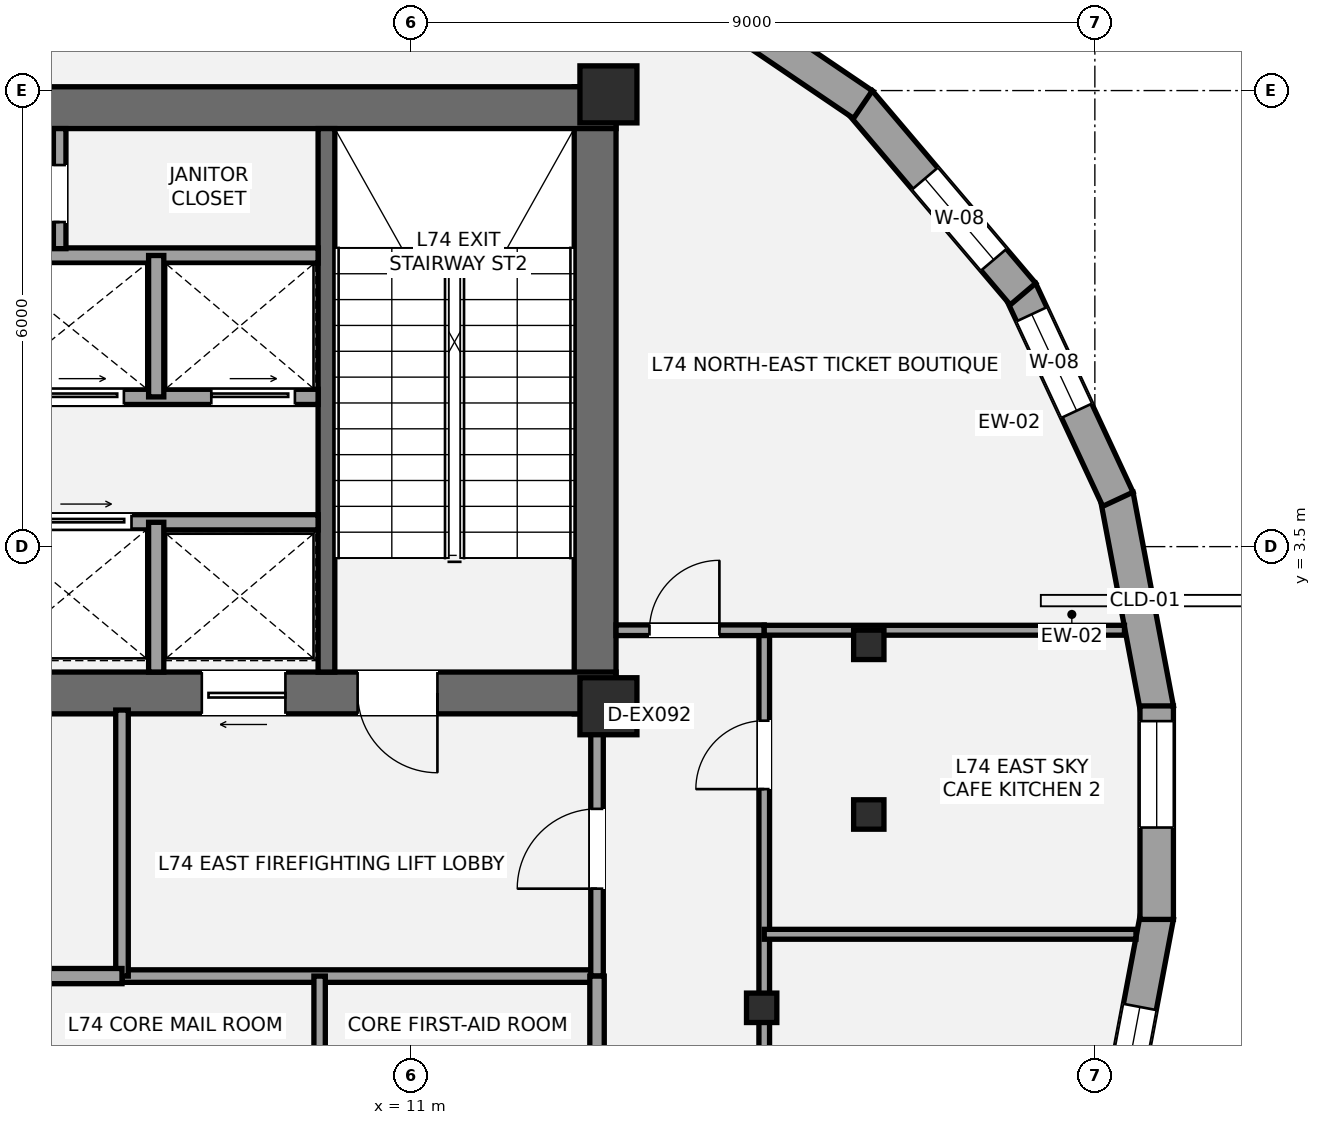
"""IFC4 building model, lengths in metres.
Left out: names, types, materials, properties, quantities, classifications, styles, units other than length and angle.
Written with IfcOpenShell. Run it as: python <this file> out.ifc"""

import sys

from ifc_helpers import new_model, si_unit, direction, frame, frame_2d, origin, origin_2d, place, context, subcontext, project, spatial, rectangle, i_section, extrude, element, fill, save


model = new_model("IFC4")
c1 = context("Model", 3, precision=1e-05, world=origin(), true_north=direction((0.0, 1.0)))
c2 = subcontext(c1, "Body", "Model", "MODEL_VIEW")
j1 = project(units=[si_unit("LENGTHUNIT", "METRE"), si_unit("PLANEANGLEUNIT", "RADIAN")], contexts=[c1])
p1 = place(None, origin())
s1 = spatial("IfcSite", under=j1, at=p1, CompositionType="ELEMENT")
p2 = place(p1, origin())
s2 = spatial("IfcBuilding", under=s1, at=p2, CompositionType="ELEMENT")
p3 = place(p2, frame((0.0, 0.0, 260.4)))
s3 = spatial("IfcBuildingStorey", under=s2, at=p3, CompositionType="ELEMENT", Elevation=260.4)
p4 = place(p3, frame((13.425, 1.3, 0.0), z_axis=(0.0, 0.0, 1.0), x_axis=(0.0, 1.0, 0.0)))
e1 = element("IfcWall", 1, at=p4, inside=s3, PredefinedType="SHEAR", context=c2, shape_type="SweptSolid", body=[
    extrude(rectangle(XDim=8.25, YDim=0.55, at=frame_2d((4.125, 0.0))), origin(), (0.0, 0.0, 1.0), 4.4),
])
p5 = place(p3, frame((4.525, 9.275, 0.0), z_axis=(0.0, 0.0, 1.0), x_axis=(1.0, 0.0, 0.0)))
e2 = element("IfcWall", 2, at=p5, inside=s3, PredefinedType="SHEAR", context=c2, shape_type="SweptSolid", body=[
    extrude(rectangle(XDim=9.175, YDim=0.55, at=frame_2d((4.587, 0.0))), origin(), (0.0, 0.0, 1.0), 4.4),
])
p6 = place(p3, frame((13.7, 1.575, 0.0), z_axis=(0.0, 0.0, 1.0), x_axis=(-1.0, 0.0, 0.0)))
e3 = element("IfcWall", 3, at=p6, inside=s3, PredefinedType="SHEAR", context=c2, shape_type="SweptSolid", body=[
    extrude(rectangle(XDim=8.775, YDim=0.55, at=frame_2d((4.387, 0.0))), origin(), (0.0, 0.0, 1.0), 4.4),
])
p7 = place(p6, frame((2.35, 0.0, 0.0)))
e4 = element("IfcOpeningElement", 4, at=p7, cuts=e3, PredefinedType="OPENING", context=c2, shape_type="SweptSolid", body=[
    extrude(rectangle(XDim=1.05, YDim=2.15, at=frame_2d((0.525, 1.075))), frame((0.0, 0.285, 0.0), z_axis=(0.0, -1.0, 0.0), x_axis=(1.0, 0.0, 0.0)), (0.0, 0.0, 1.0), 0.57),
])
p8 = place(p6, frame((4.35, 0.0, 0.0)))
e5 = element("IfcOpeningElement", 5, at=p8, cuts=e3, PredefinedType="OPENING", context=c2, shape_type="SweptSolid", body=[
    extrude(rectangle(XDim=1.1, YDim=2.2, at=frame_2d((0.55, 1.1))), frame((0.0, 0.285, 0.0), z_axis=(0.0, -1.0, 0.0), x_axis=(1.0, 0.0, 0.0)), (0.0, 0.0, 1.0), 0.57),
])
p9 = place(p3, frame((9.89, 1.85, 0.0), z_axis=(0.0, 0.0, 1.0), x_axis=(0.0, 1.0, 0.0)))
e6 = element("IfcWall", 6, at=p9, inside=s3, PredefinedType="SHEAR", context=c2, shape_type="SweptSolid", body=[
    extrude(rectangle(XDim=7.15, YDim=0.22, at=frame_2d((3.575, 0.0))), origin(), (0.0, 0.0, 1.0), 4.4),
])
for number, where, z_axis, x_axis in (
    (7, (13.6, 1.4, 0.0), (0.0, 0.0, 1.0), (1.0, 0.0, 0.0)),
    (8, (13.6, 9.45, 0.0), (0.0, 0.0, 1.0), (1.0, 0.0, 0.0)),
):
    element("IfcColumn", number, at=place(p3, frame(where, z_axis=z_axis, x_axis=x_axis)), inside=s3, PredefinedType="PILASTER", context=c2, shape_type="SweptSolid", body=[
        extrude(rectangle(XDim=0.75, YDim=0.75, at=origin_2d()), origin(), (0.0, 0.0, 1.0), 4.4),
    ])
for number, where, z_axis, x_axis in (
    (9, (17.026, 2.208, 0.0), (0.0, 0.0, 1.0), (1.0, 0.0, 0.0)),
    (10, (15.616, -2.567, 0.0), (0.0, 0.0, 1.0), (1.0, 0.0, 0.0)),
    (11, (17.026, -0.024, 0.0), (0.0, 0.0, 1.0), (1.0, 0.0, 0.0)),
):
    element("IfcColumn", number, at=place(p3, frame(where, z_axis=z_axis, x_axis=x_axis)), inside=s3, PredefinedType="COLUMN", context=c2, shape_type="SweptSolid", body=[
        extrude(i_section(OverallWidth=0.399, OverallDepth=0.387, WebThickness=0.021, FlangeThickness=0.033, at=origin_2d()), origin(), (0.0, 0.0, 1.0), 4.4),
    ])
p10 = place(p3, frame((20.286, 4.176, 0.0), z_axis=(0.0, 0.0, 1.0), x_axis=(0.185555519657, -0.982633781795, 0.0)))
e12 = element("IfcWall", 12, at=p10, inside=s3, PredefinedType="STANDARD", context=c2, shape_type="SweptSolid", body=[
    extrude(rectangle(XDim=2.862, YDim=0.44, at=frame_2d((1.431, 0.0))), origin(), (0.0, 0.0, 1.0), 3.546),
])
p11 = place(p3, frame((19.022, 6.872, 0.0), z_axis=(0.0, 0.0, 1.0), x_axis=(0.422378607623, -0.906419501016, 0.0)))
e13 = element("IfcWall", 13, at=p11, inside=s3, PredefinedType="STANDARD", context=c2, shape_type="SweptSolid", body=[
    extrude(rectangle(XDim=3.033, YDim=0.44, at=frame_2d((1.517, 0.0))), origin(), (0.0, 0.0, 1.0), 3.546),
])
p12 = place(p11, frame((0.348, 0.0, 0.58)))
e14 = element("IfcOpeningElement", 14, at=p12, cuts=e13, PredefinedType="OPENING", context=c2, shape_type="SweptSolid", body=[
    extrude(rectangle(XDim=1.4, YDim=1.55, at=frame_2d((0.7, 0.775))), frame((0.0, 0.23, 0.0), z_axis=(0.0, -1.0, 0.0), x_axis=(1.0, 0.0, 0.0)), (0.0, 0.0, 1.0), 0.46),
])
p13 = place(p3, frame((16.904, 9.356, 0.0), z_axis=(0.0, 0.0, 1.0), x_axis=(0.647061604266, -0.762437722233, 0.0)))
e15 = element("IfcWall", 15, at=p13, inside=s3, PredefinedType="STANDARD", context=c2, shape_type="SweptSolid", body=[
    extrude(rectangle(XDim=3.322, YDim=0.44, at=frame_2d((1.661, 0.0))), origin(), (0.0, 0.0, 1.0), 3.546),
])
p14 = place(p13, frame((1.329, 0.0, 0.58)))
e16 = element("IfcOpeningElement", 16, at=p14, cuts=e15, PredefinedType="OPENING", context=c2, shape_type="SweptSolid", body=[
    extrude(rectangle(XDim=1.4, YDim=1.55, at=frame_2d((0.7, 0.775))), frame((0.0, 0.23, 0.0), z_axis=(0.0, -1.0, 0.0), x_axis=(1.0, 0.0, 0.0)), (0.0, 0.0, 1.0), 0.46),
])
p15 = place(p3, frame((13.887, 11.391, 0.0), z_axis=(0.0, 0.0, 1.0), x_axis=(0.827739678134, -0.561112310721, 0.0)))
e17 = element("IfcWall", 17, at=p15, inside=s3, PredefinedType="STANDARD", context=c2, shape_type="SweptSolid", body=[
    extrude(rectangle(XDim=3.698, YDim=0.44, at=frame_2d((1.849, 0.0))), origin(), (0.0, 0.0, 1.0), 3.55),
])
p16 = place(p15, frame((0.3, 0.0, 0.58)))
e18 = element("IfcOpeningElement", 18, at=p16, cuts=e17, PredefinedType="OPENING", context=c2, shape_type="SweptSolid", body=[
    extrude(rectangle(XDim=0.9, YDim=1.35, at=frame_2d((0.45, 0.675))), frame((0.0, 0.23, 0.0), z_axis=(0.0, -1.0, 0.0), x_axis=(1.0, 0.0, 0.0)), (0.0, 0.0, 1.0), 0.46),
])
p17 = place(p3, frame((20.817, -1.364, 0.0), z_axis=(0.0, 0.0, 1.0), x_axis=(-0.185555519657, -0.982633781795, 0.0)))
e19 = element("IfcWall", 19, at=p17, inside=s3, PredefinedType="STANDARD", context=c2, shape_type="SweptSolid", body=[
    extrude(rectangle(XDim=2.862, YDim=0.44, at=frame_2d((1.431, 0.0))), origin(), (0.0, 0.0, 1.0), 3.546),
])
p18 = place(p17, frame((1.213, 0.0, 0.6)))
e20 = element("IfcOpeningElement", 20, at=p18, cuts=e19, PredefinedType="OPENING", context=c2, shape_type="SweptSolid", body=[
    extrude(rectangle(XDim=1.4, YDim=1.55, at=frame_2d((0.7, 0.775))), frame((0.0, 0.23, 0.0), z_axis=(0.0, -1.0, 0.0), x_axis=(1.0, 0.0, 0.0)), (0.0, 0.0, 1.0), 0.46),
])
p19 = place(p3, frame((20.814, 1.404, 0.0), z_axis=(0.0, 0.0, 1.0), x_axis=(0.0, -1.0, 0.0)))
e21 = element("IfcWall", 21, at=p19, inside=s3, PredefinedType="STANDARD", context=c2, shape_type="SweptSolid", body=[
    extrude(rectangle(XDim=2.809, YDim=0.44, at=frame_2d((1.404, 0.0))), origin(), (0.0, 0.0, 1.0), 3.546),
])
p20 = place(p19, frame((0.2, 0.0, 0.58)))
e22 = element("IfcOpeningElement", 22, at=p20, cuts=e21, PredefinedType="OPENING", context=c2, shape_type="SweptSolid", body=[
    extrude(rectangle(XDim=1.4, YDim=1.55, at=frame_2d((0.7, 0.775))), frame((0.0, 0.23, 0.0), z_axis=(0.0, -1.0, 0.0), x_axis=(1.0, 0.0, 0.0)), (0.0, 0.0, 1.0), 0.46),
])
p21 = place(p3, frame((7.2, -2.15, 0.0), z_axis=(0.0, 0.0, 1.0), x_axis=(1.0, 0.0, 0.0)))
e23 = element("IfcWall", 23, at=p21, inside=s3, PredefinedType="PARTITIONING", context=c2, shape_type="SweptSolid", body=[
    extrude(rectangle(XDim=6.25, YDim=0.165, at=frame_2d((3.125, 0.0))), origin(), (0.0, 0.0, 1.0), 2.37),
])
p22 = place(p3, frame((7.2, -2.15, 0.0), z_axis=(0.0, 0.0, 1.0), x_axis=(0.0, 1.0, 0.0)))
e24 = element("IfcWall", 24, at=p22, inside=s3, PredefinedType="PARTITIONING", context=c2, shape_type="SweptSolid", body=[
    extrude(rectangle(XDim=3.5, YDim=0.165, at=frame_2d((1.75, 0.0))), origin(), (0.0, 0.0, 1.0), 2.37),
])
p23 = place(p3, frame((13.45, -2.15, 0.0), z_axis=(0.0, 0.0, 1.0), x_axis=(0.0, 1.0, 0.0)))
e25 = element("IfcWall", 25, at=p23, inside=s3, PredefinedType="PARTITIONING", context=c2, shape_type="SweptSolid", body=[
    extrude(rectangle(XDim=3.5, YDim=0.165, at=frame_2d((1.75, 0.0))), origin(), (0.0, 0.0, 1.0), 2.37),
])
p24 = place(p23, frame((1.15, 0.0, 0.0)))
e26 = element("IfcOpeningElement", 26, at=p24, cuts=e25, PredefinedType="OPENING", context=c2, shape_type="SweptSolid", body=[
    extrude(rectangle(XDim=1.05, YDim=2.15, at=frame_2d((0.525, 1.075))), frame((0.0, 0.093, 0.0), z_axis=(0.0, -1.0, 0.0), x_axis=(1.0, 0.0, 0.0)), (0.0, 0.0, 1.0), 0.185),
])
p25 = place(p3, frame((4.95, -2.15, 0.0), z_axis=(0.0, 0.0, 1.0), x_axis=(1.0, 0.0, 0.0)))
e27 = element("IfcWall", 27, at=p25, inside=s3, PredefinedType="SOLIDWALL", context=c2, shape_type="SweptSolid", body=[
    extrude(rectangle(XDim=2.25, YDim=0.2, at=frame_2d((1.125, 0.0))), origin(), (0.0, 0.0, 1.0), 2.37),
])
p26 = place(p3, frame((5.475, 3.82, 0.0), z_axis=(0.0, 0.0, 1.0), x_axis=(1.0, 0.0, 0.0)))
e28 = element("IfcWall", 28, at=p26, inside=s3, PredefinedType="SOLIDWALL", context=c2, shape_type="SweptSolid", body=[
    extrude(rectangle(XDim=4.305, YDim=0.2, at=frame_2d((2.152, 0.0))), origin(), (0.0, 0.0, 1.0), 4.18),
])
p27 = place(p26, frame((0.65, 0.0, 0.0)))
e29 = element("IfcOpeningElement", 29, at=p27, cuts=e28, PredefinedType="OPENING", context=c2, shape_type="SweptSolid", body=[
    extrude(rectangle(XDim=1.2, YDim=2.2, at=frame_2d((0.6, 1.1))), frame((0.0, 0.11, 0.0), z_axis=(0.0, -1.0, 0.0), x_axis=(1.0, 0.0, 0.0)), (0.0, 0.0, 1.0), 0.22),
])
p28 = place(p3, frame((7.65, 1.85, 0.0), z_axis=(0.0, 0.0, 1.0), x_axis=(0.0, 1.0, 0.0)))
e30 = element("IfcWall", 30, at=p28, inside=s3, PredefinedType="SOLIDWALL", context=c2, shape_type="SweptSolid", body=[
    extrude(rectangle(XDim=1.97, YDim=0.2, at=frame_2d((0.985, 0.0))), origin(), (0.0, 0.0, 1.0), 4.18),
])
p29 = place(p3, frame((5.475, 5.47, 0.0), z_axis=(0.0, 0.0, 1.0), x_axis=(1.0, 0.0, 0.0)))
e31 = element("IfcWall", 31, at=p29, inside=s3, PredefinedType="SOLIDWALL", context=c2, shape_type="SweptSolid", body=[
    extrude(rectangle(XDim=4.305, YDim=0.2, at=frame_2d((2.152, 0.0))), origin(), (0.0, 0.0, 1.0), 4.18),
])
p30 = place(p29, frame((0.65, 0.0, 0.0)))
e32 = element("IfcOpeningElement", 32, at=p30, cuts=e31, PredefinedType="OPENING", context=c2, shape_type="SweptSolid", body=[
    extrude(rectangle(XDim=1.1, YDim=2.2, at=frame_2d((0.55, 1.1))), frame((0.0, 0.11, 0.0), z_axis=(0.0, -1.0, 0.0), x_axis=(1.0, 0.0, 0.0)), (0.0, 0.0, 1.0), 0.22),
])
p31 = place(p29, frame((2.9, 0.0, 0.0)))
e33 = element("IfcOpeningElement", 33, at=p31, cuts=e31, PredefinedType="OPENING", context=c2, shape_type="SweptSolid", body=[
    extrude(rectangle(XDim=1.1, YDim=2.2, at=frame_2d((0.55, 1.1))), frame((0.0, 0.11, 0.0), z_axis=(0.0, -1.0, 0.0), x_axis=(1.0, 0.0, 0.0)), (0.0, 0.0, 1.0), 0.22),
])
p32 = place(p3, frame((5.475, 7.33, 0.0), z_axis=(0.0, 0.0, 1.0), x_axis=(1.0, 0.0, 0.0)))
e34 = element("IfcWall", 34, at=p32, inside=s3, PredefinedType="SOLIDWALL", context=c2, shape_type="SweptSolid", body=[
    extrude(rectangle(XDim=4.305, YDim=0.2, at=frame_2d((2.152, 0.0))), origin(), (0.0, 0.0, 1.0), 4.18),
])
p33 = place(p3, frame((7.65, 5.47, 0.0), z_axis=(0.0, 0.0, 1.0), x_axis=(0.0, 1.0, 0.0)))
e35 = element("IfcWall", 35, at=p33, inside=s3, PredefinedType="SOLIDWALL", context=c2, shape_type="SweptSolid", body=[
    extrude(rectangle(XDim=1.86, YDim=0.2, at=frame_2d((0.93, 0.0))), origin(), (0.0, 0.0, 1.0), 4.18),
])
p34 = place(p3, frame((6.38, 7.42, 0.0), z_axis=(0.0, 0.0, 1.0), x_axis=(0.0, 1.0, 0.0)))
e36 = element("IfcWall", 36, at=p34, inside=s3, PredefinedType="PARTITIONING", context=c2, shape_type="SweptSolid", body=[
    extrude(rectangle(XDim=1.58, YDim=0.165, at=frame_2d((0.79, 0.0))), origin(), (0.0, 0.0, 1.0), 4.18),
])
p35 = place(p34, frame((0.35, 0.0, 0.0)))
e37 = element("IfcOpeningElement", 37, at=p35, cuts=e36, PredefinedType="OPENING", context=c2, shape_type="SweptSolid", body=[
    extrude(rectangle(XDim=0.75, YDim=2.1, at=frame_2d((0.375, 1.05))), frame((0.0, 0.093, 0.0), z_axis=(0.0, -1.0, 0.0), x_axis=(1.0, 0.0, 0.0)), (0.0, 0.0, 1.0), 0.185),
])
p36 = place(p3, frame((13.45, -4.05, 0.0), z_axis=(0.0, 0.0, 1.0), x_axis=(0.0, 1.0, 0.0)))
e38 = element("IfcWall", 38, at=p36, inside=s3, PredefinedType="PLUMBINGWALL", context=c2, shape_type="SweptSolid", body=[
    extrude(rectangle(XDim=1.9, YDim=0.19, at=frame_2d((0.95, 0.0))), origin(), (0.0, 0.0, 1.0), 3.633),
])
p37 = place(p3, frame((9.8, -4.05, 0.0), z_axis=(0.0, 0.0, 1.0), x_axis=(0.0, 1.0, 0.0)))
e39 = element("IfcWall", 39, at=p37, inside=s3, PredefinedType="PLUMBINGWALL", context=c2, shape_type="SweptSolid", body=[
    extrude(rectangle(XDim=1.9, YDim=0.15, at=frame_2d((0.95, 0.0))), origin(), (0.0, 0.0, 1.0), 3.633),
])
p38 = place(p3, frame((15.65, -9.921, 0.0), z_axis=(0.0, 0.0, 1.0), x_axis=(0.0, 1.0, 0.0)))
e40 = element("IfcWall", 40, at=p38, inside=s3, PredefinedType="PARTITIONING", context=c2, shape_type="SweptSolid", body=[
    extrude(rectangle(XDim=12.321, YDim=0.14, at=frame_2d((6.16, 0.0))), origin(), (0.0, 0.0, 1.0), 2.37),
])
p39 = place(p38, frame((5.396, 0.0, 0.0)))
e41 = element("IfcOpeningElement", 41, at=p39, cuts=e40, PredefinedType="OPENING", context=c2, shape_type="SweptSolid", body=[
    extrude(rectangle(XDim=0.9, YDim=2.1, at=frame_2d((0.45, 1.05))), frame((0.0, 0.08, 0.0), z_axis=(0.0, -1.0, 0.0), x_axis=(1.0, 0.0, 0.0)), (0.0, 0.0, 1.0), 0.16),
])
p40 = place(p38, frame((10.231, 0.0, 0.0)))
e42 = element("IfcOpeningElement", 42, at=p40, cuts=e40, PredefinedType="OPENING", context=c2, shape_type="SweptSolid", body=[
    extrude(rectangle(XDim=0.9, YDim=2.1, at=frame_2d((0.45, 1.05))), frame((0.0, 0.08, 0.0), z_axis=(0.0, -1.0, 0.0), x_axis=(1.0, 0.0, 0.0)), (0.0, 0.0, 1.0), 0.16),
])
p41 = place(p3, frame((13.7, 2.4, 0.0), z_axis=(0.0, 0.0, 1.0), x_axis=(1.0, 0.0, 0.0)))
e43 = element("IfcWall", 43, at=p41, inside=s3, PredefinedType="PARTITIONING", context=c2, shape_type="SweptSolid", body=[
    extrude(rectangle(XDim=1.95, YDim=0.14, at=frame_2d((0.975, 0.0))), origin(), (0.0, 0.0, 1.0), 3.633),
])
p42 = place(p41, frame((0.44, 0.0, 0.0)))
e44 = element("IfcOpeningElement", 44, at=p42, cuts=e43, PredefinedType="OPENING", context=c2, shape_type="SweptSolid", body=[
    extrude(rectangle(XDim=0.92, YDim=2.15, at=frame_2d((0.46, 1.075))), frame((0.0, 0.08, 0.0), z_axis=(0.0, -1.0, 0.0), x_axis=(1.0, 0.0, 0.0)), (0.0, 0.0, 1.0), 0.16),
])
p43 = place(p3, frame((15.65, 2.4, 0.0), z_axis=(0.0, 0.0, 1.0), x_axis=(1.0, 0.0, 0.0)))
e45 = element("IfcWall", 45, at=p43, inside=s3, PredefinedType="PARTITIONING", context=c2, shape_type="SweptSolid", body=[
    extrude(rectangle(XDim=4.74, YDim=0.13, at=frame_2d((2.37, 0.0))), origin(), (0.0, 0.0, 1.0), 3.633),
])
p44 = place(p3, frame((15.65, -1.6, 0.0), z_axis=(0.0, 0.0, 1.0), x_axis=(1.0, 0.0, 0.0)))
e46 = element("IfcWall", 46, at=p44, inside=s3, PredefinedType="PARTITIONING", context=c2, shape_type="SweptSolid", body=[
    extrude(rectangle(XDim=4.891, YDim=0.13, at=frame_2d((2.445, 0.0))), origin(), (0.0, 0.0, 1.0), 3.633),
])
p45 = place(p12, origin())
e47 = element("IfcWindow", 47, at=p45, inside=s3, PartitioningType="SINGLE_PANEL", PredefinedType="WINDOW", context=c2, shape_type="SweptSolid", body=[
    extrude(rectangle(XDim=1.4, YDim=1.55, at=frame_2d((0.7, 0.775))), frame((0.0, -0.01, 0.0), z_axis=(0.0, -1.0, 0.0), x_axis=(1.0, 0.0, 0.0)), (0.0, 0.0, 1.0), 0.06),
])
fill(e14, e47)
p46 = place(p14, origin())
e48 = element("IfcWindow", 48, at=p46, inside=s3, PartitioningType="SINGLE_PANEL", PredefinedType="WINDOW", context=c2, shape_type="SweptSolid", body=[
    extrude(rectangle(XDim=1.4, YDim=1.55, at=frame_2d((0.7, 0.775))), frame((0.0, -0.01, 0.0), z_axis=(0.0, -1.0, 0.0), x_axis=(1.0, 0.0, 0.0)), (0.0, 0.0, 1.0), 0.06),
])
fill(e16, e48)
p47 = place(p18, origin())
e49 = element("IfcWindow", 49, at=p47, inside=s3, PartitioningType="SINGLE_PANEL", PredefinedType="WINDOW", context=c2, shape_type="SweptSolid", body=[
    extrude(rectangle(XDim=1.4, YDim=1.55, at=frame_2d((0.7, 0.775))), frame((0.0, -0.01, 0.0), z_axis=(0.0, -1.0, 0.0), x_axis=(1.0, 0.0, 0.0)), (0.0, 0.0, 1.0), 0.06),
])
fill(e20, e49)
p48 = place(p20, origin())
e50 = element("IfcWindow", 50, at=p48, inside=s3, PartitioningType="SINGLE_PANEL", PredefinedType="WINDOW", context=c2, shape_type="SweptSolid", body=[
    extrude(rectangle(XDim=1.4, YDim=1.55, at=frame_2d((0.7, 0.775))), frame((0.0, -0.01, 0.0), z_axis=(0.0, -1.0, 0.0), x_axis=(1.0, 0.0, 0.0)), (0.0, 0.0, 1.0), 0.06),
])
fill(e22, e50)
p49 = place(p7, origin())
e51 = element("IfcDoor", 51, at=p49, inside=s3, OperationType="SINGLE_SWING_LEFT", PredefinedType="DOOR", context=c2, shape_type="SweptSolid", body=[
    extrude(rectangle(XDim=1.05, YDim=2.15, at=frame_2d((0.525, 1.075))), frame((0.0, 0.025, 0.0), z_axis=(0.0, -1.0, 0.0), x_axis=(1.0, 0.0, 0.0)), (0.0, 0.0, 1.0), 0.05),
])
fill(e4, e51)
p50 = place(p24, origin())
e52 = element("IfcDoor", 52, at=p50, inside=s3, OperationType="SINGLE_SWING_LEFT", PredefinedType="DOOR", context=c2, shape_type="SweptSolid", body=[
    extrude(rectangle(XDim=1.05, YDim=2.15, at=frame_2d((0.525, 1.075))), frame((0.0, 0.025, 0.0), z_axis=(0.0, -1.0, 0.0), x_axis=(1.0, 0.0, 0.0)), (0.0, 0.0, 1.0), 0.05),
])
fill(e26, e52)
p51 = place(p8, origin())
e53 = element("IfcDoor", 53, at=p51, inside=s3, OperationType="SLIDING_TO_LEFT", PredefinedType="DOOR", context=c2, shape_type="SweptSolid", body=[
    extrude(rectangle(XDim=1.1, YDim=2.2, at=frame_2d((0.55, 1.1))), frame((0.0, 0.025, 0.0), z_axis=(0.0, -1.0, 0.0), x_axis=(1.0, 0.0, 0.0)), (0.0, 0.0, 1.0), 0.05),
])
fill(e5, e53)
p52 = place(p27, origin())
e54 = element("IfcDoor", 54, at=p52, inside=s3, OperationType="SLIDING_TO_RIGHT", PredefinedType="DOOR", context=c2, shape_type="SweptSolid", body=[
    extrude(rectangle(XDim=1.2, YDim=2.2, at=frame_2d((0.6, 1.1))), frame((0.0, 0.025, 0.0), z_axis=(0.0, -1.0, 0.0), x_axis=(1.0, 0.0, 0.0)), (0.0, 0.0, 1.0), 0.05),
])
fill(e29, e54)
p53 = place(p30, origin())
e55 = element("IfcDoor", 55, at=p53, inside=s3, OperationType="SLIDING_TO_LEFT", PredefinedType="DOOR", context=c2, shape_type="SweptSolid", body=[
    extrude(rectangle(XDim=1.1, YDim=2.2, at=frame_2d((0.55, 1.1))), frame((0.0, 0.025, 0.0), z_axis=(0.0, -1.0, 0.0), x_axis=(1.0, 0.0, 0.0)), (0.0, 0.0, 1.0), 0.05),
])
fill(e32, e55)
p54 = place(p31, origin())
e56 = element("IfcDoor", 56, at=p54, inside=s3, OperationType="SLIDING_TO_LEFT", PredefinedType="DOOR", context=c2, shape_type="SweptSolid", body=[
    extrude(rectangle(XDim=1.1, YDim=2.2, at=frame_2d((0.55, 1.1))), frame((0.0, 0.025, 0.0), z_axis=(0.0, -1.0, 0.0), x_axis=(1.0, 0.0, 0.0)), (0.0, 0.0, 1.0), 0.05),
])
fill(e33, e56)
p55 = place(p35, origin())
e57 = element("IfcDoor", 57, at=p55, inside=s3, OperationType="SINGLE_SWING_LEFT", PredefinedType="DOOR", context=c2, shape_type="SweptSolid", body=[
    extrude(rectangle(XDim=0.75, YDim=2.1, at=frame_2d((0.375, 1.05))), frame((0.0, 0.025, 0.0), z_axis=(0.0, -1.0, 0.0), x_axis=(1.0, 0.0, 0.0)), (0.0, 0.0, 1.0), 0.05),
])
fill(e37, e57)
p56 = place(p42, origin())
e58 = element("IfcDoor", 58, at=p56, inside=s3, OperationType="SINGLE_SWING_RIGHT", PredefinedType="DOOR", context=c2, shape_type="SweptSolid", body=[
    extrude(rectangle(XDim=0.92, YDim=2.15, at=frame_2d((0.46, 1.075))), frame((0.0, 0.025, 0.0), z_axis=(0.0, -1.0, 0.0), x_axis=(1.0, 0.0, 0.0)), (0.0, 0.0, 1.0), 0.05),
])
fill(e44, e58)
p57 = place(p40, origin())
e59 = element("IfcDoor", 59, at=p57, inside=s3, OperationType="SINGLE_SWING_LEFT", PredefinedType="DOOR", context=c2, shape_type="SweptSolid", body=[
    extrude(rectangle(XDim=0.9, YDim=2.1, at=frame_2d((0.45, 1.05))), frame((0.0, 0.025, 0.0), z_axis=(0.0, -1.0, 0.0), x_axis=(1.0, 0.0, 0.0)), (0.0, 0.0, 1.0), 0.05),
])
fill(e42, e59)
save(model, sys.argv[1])
